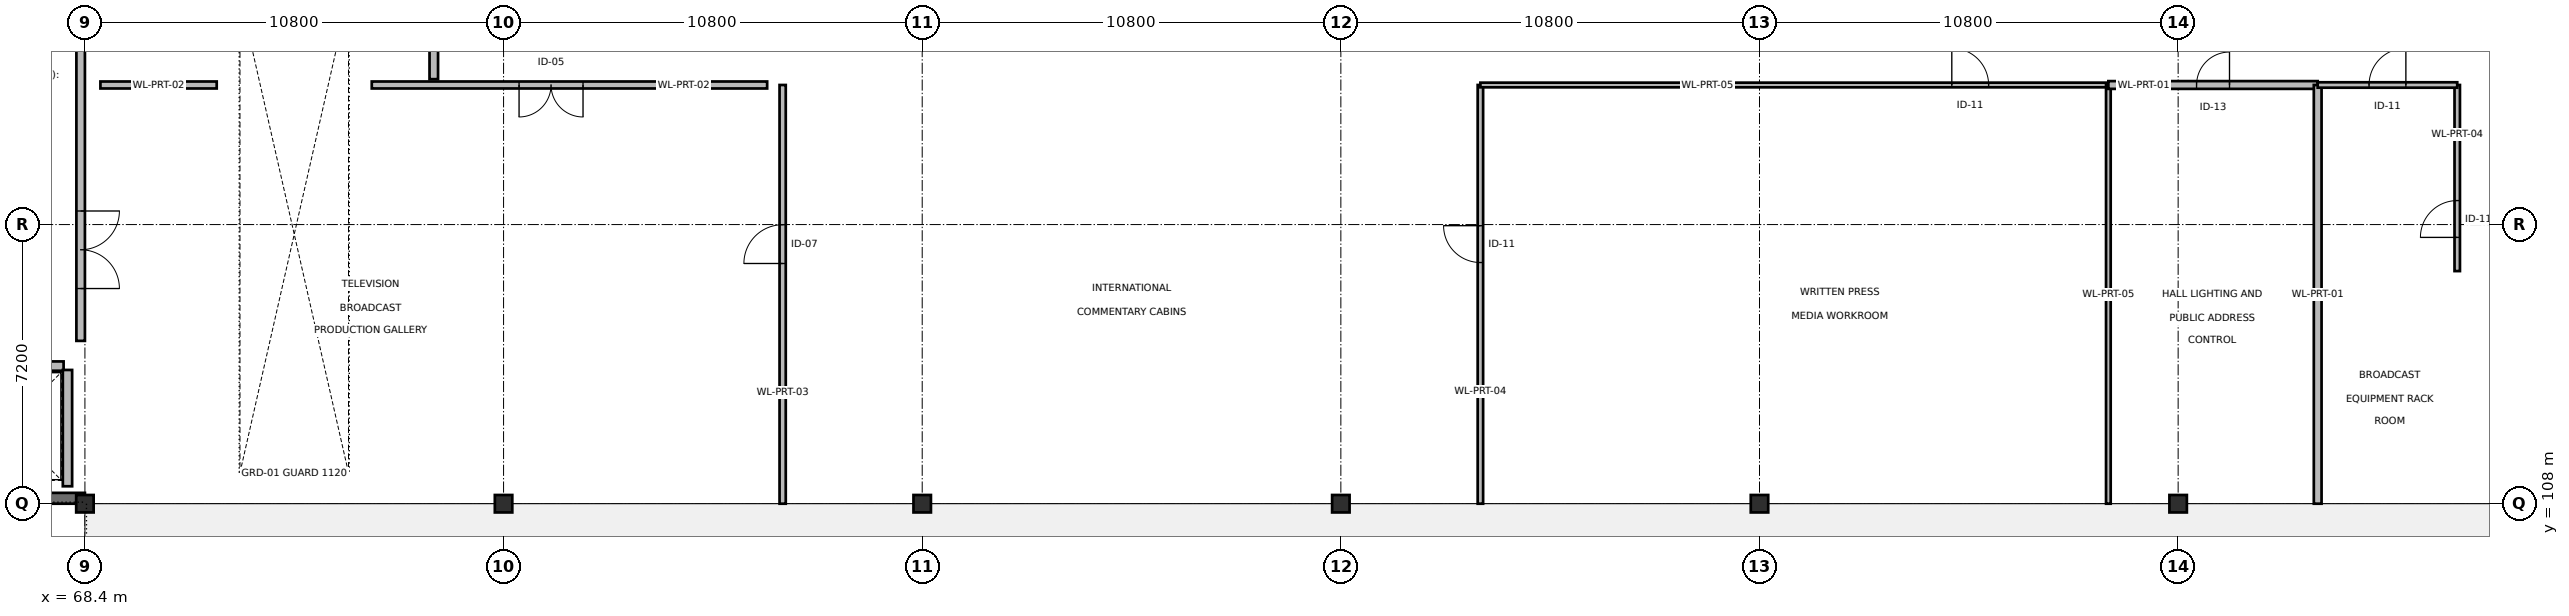
"""IFC4 building model, lengths in metres.
Left out: names, types, materials, properties, quantities, classifications, styles, units other than length and angle.
Written with IfcOpenShell. Run it as: python <this file> out.ifc"""

import sys

from ifc_helpers import new_model, si_unit, direction, frame, frame_2d, origin, origin_2d, place, context, subcontext, project, spatial, rectangle, extrude, element, fill, save


model = new_model("IFC4")
c1 = context("Model", 3, precision=1e-05, world=origin(), true_north=direction((0.0, 1.0)))
c2 = subcontext(c1, "Body", "Model", "MODEL_VIEW")
j1 = project(units=[si_unit("LENGTHUNIT", "METRE"), si_unit("PLANEANGLEUNIT", "RADIAN")], contexts=[c1])
p1 = place(None, origin())
s1 = spatial("IfcSite", under=j1, at=p1, CompositionType="ELEMENT")
p2 = place(p1, origin())
s2 = spatial("IfcBuilding", under=s1, at=p2, CompositionType="ELEMENT")
p3 = place(p2, frame((0.0, 0.0, 9.6)))
s3 = spatial("IfcBuildingStorey", under=s2, at=p3, CompositionType="ELEMENT", Elevation=9.6)
for number, where, z_axis, x_axis in (
    (1, (68.4, 108.0, 0.0), (0.0, 0.0, 1.0), (1.0, 0.0, 0.0)),
    (2, (79.2, 108.0, 0.0), (0.0, 0.0, 1.0), (1.0, 0.0, 0.0)),
    (3, (90.0, 108.0, 0.0), (0.0, 0.0, 1.0), (1.0, 0.0, 0.0)),
    (4, (100.8, 108.0, 0.0), (0.0, 0.0, 1.0), (1.0, 0.0, 0.0)),
    (5, (111.6, 108.0, 0.0), (0.0, 0.0, 1.0), (1.0, 0.0, 0.0)),
    (6, (122.4, 108.0, 0.0), (0.0, 0.0, 1.0), (1.0, 0.0, 0.0)),
):
    element("IfcColumn", number, at=place(p3, frame(where, z_axis=z_axis, x_axis=x_axis)), inside=s3, PredefinedType="COLUMN", context=c2, shape_type="SweptSolid", body=[
        extrude(rectangle(XDim=0.45, YDim=0.45, at=origin_2d()), origin(), (0.0, 0.0, 1.0), 4.5),
    ])
p4 = place(p3, frame((57.6, 108.14, 0.0), z_axis=(0.0, 0.0, 1.0), x_axis=(1.0, 0.0, 0.0)))
e7 = element("IfcWall", 7, at=p4, inside=s3, PredefinedType="SHEAR", context=c2, shape_type="SweptSolid", body=[
    extrude(rectangle(XDim=10.8, YDim=0.28, at=frame_2d((5.4, 0.0))), origin(), (0.0, 0.0, 1.0), 4.5),
])
p5 = place(p3, frame((64.95, 111.55, 0.0), z_axis=(0.0, 0.0, 1.0), x_axis=(1.0, 0.0, 0.0)))
e8 = element("IfcWall", 8, at=p5, inside=s3, PredefinedType="SOLIDWALL", context=c2, shape_type="SweptSolid", body=[
    extrude(rectangle(XDim=2.9, YDim=0.24, at=frame_2d((1.45, 0.0))), origin(), (0.0, 0.0, 1.0), 4.205),
])
p6 = place(p5, frame((0.9, 0.0, 0.0)))
e9 = element("IfcOpeningElement", 9, at=p6, cuts=e8, PredefinedType="OPENING", context=c2, shape_type="SweptSolid", body=[
    extrude(rectangle(XDim=1.1, YDim=2.15, at=frame_2d((0.55, 1.075))), frame((0.0, 0.13, 0.0), z_axis=(0.0, -1.0, 0.0), x_axis=(1.0, 0.0, 0.0)), (0.0, 0.0, 1.0), 0.26),
])
p7 = place(p3, frame((67.95, 108.45, 0.0), z_axis=(0.0, 0.0, 1.0), x_axis=(0.0, 1.0, 0.0)))
e10 = element("IfcWall", 10, at=p7, inside=s3, PredefinedType="SOLIDWALL", context=c2, shape_type="SweptSolid", body=[
    extrude(rectangle(XDim=3.0, YDim=0.24, at=frame_2d((1.5, 0.0))), origin(), (0.0, 0.0, 1.0), 4.205),
])
p8 = place(p3, frame((68.29, 112.2, 0.0), z_axis=(0.0, 0.0, 1.0), x_axis=(0.0, 1.0, 0.0)))
e11 = element("IfcWall", 11, at=p8, inside=s3, PredefinedType="PARTITIONING", context=c2, shape_type="SweptSolid", body=[
    extrude(rectangle(XDim=9.75, YDim=0.22, at=frame_2d((4.875, 0.0))), origin(), (0.0, 0.0, 1.0), 4.205),
])
p9 = place(p8, frame((1.35, 0.0, 0.0)))
e12 = element("IfcOpeningElement", 12, at=p9, cuts=e11, PredefinedType="OPENING", context=c2, shape_type="SweptSolid", body=[
    extrude(rectangle(XDim=2.0, YDim=2.2, at=frame_2d((1.0, 1.1))), frame((0.0, 0.12, 0.0), z_axis=(0.0, -1.0, 0.0), x_axis=(1.0, 0.0, 0.0)), (0.0, 0.0, 1.0), 0.24),
])
p10 = place(p3, frame((68.8, 118.8, 0.0), z_axis=(0.0, 0.0, 1.0), x_axis=(1.0, 0.0, 0.0)))
e13 = element("IfcWall", 13, at=p10, inside=s3, PredefinedType="PARTITIONING", context=c2, shape_type="SweptSolid", body=[
    extrude(rectangle(XDim=3.0, YDim=0.18, at=frame_2d((1.5, 0.0))), origin(), (0.0, 0.0, 1.0), 3.885),
])
p11 = place(p3, frame((75.8, 118.8, 0.0), z_axis=(0.0, 0.0, 1.0), x_axis=(1.0, 0.0, 0.0)))
e14 = element("IfcWall", 14, at=p11, inside=s3, PredefinedType="PARTITIONING", context=c2, shape_type="SweptSolid", body=[
    extrude(rectangle(XDim=10.2, YDim=0.18, at=frame_2d((5.1, 0.0))), origin(), (0.0, 0.0, 1.0), 2.682),
])
p12 = place(p11, frame((3.8, 0.0, 0.0)))
e15 = element("IfcOpeningElement", 15, at=p12, cuts=e14, PredefinedType="OPENING", context=c2, shape_type="SweptSolid", body=[
    extrude(rectangle(XDim=1.65, YDim=2.2, at=frame_2d((0.825, 1.1))), frame((0.0, 0.1, 0.0), z_axis=(0.0, -1.0, 0.0), x_axis=(1.0, 0.0, 0.0)), (0.0, 0.0, 1.0), 0.2),
])
p13 = place(p3, frame((86.4, 108.0, 0.0), z_axis=(0.0, 0.0, 1.0), x_axis=(0.0, 1.0, 0.0)))
e16 = element("IfcWall", 16, at=p13, inside=s3, PredefinedType="PARTITIONING", context=c2, shape_type="SweptSolid", body=[
    extrude(rectangle(XDim=10.8, YDim=0.16, at=frame_2d((5.4, 0.0))), origin(), (0.0, 0.0, 1.0), 2.325),
])
p14 = place(p13, frame((6.196, 0.0, 0.0)))
e17 = element("IfcOpeningElement", 17, at=p14, cuts=e16, PredefinedType="OPENING", context=c2, shape_type="SweptSolid", body=[
    extrude(rectangle(XDim=1.0, YDim=2.1, at=frame_2d((0.5, 1.05))), frame((0.0, 0.09, 0.0), z_axis=(0.0, -1.0, 0.0), x_axis=(1.0, 0.0, 0.0)), (0.0, 0.0, 1.0), 0.18),
])
p15 = place(p3, frame((104.4, 108.0, 0.0), z_axis=(0.0, 0.0, 1.0), x_axis=(0.0, 1.0, 0.0)))
e18 = element("IfcWall", 18, at=p15, inside=s3, PredefinedType="PARTITIONING", context=c2, shape_type="SweptSolid", body=[
    extrude(rectangle(XDim=10.8, YDim=0.14, at=frame_2d((5.4, 0.0))), origin(), (0.0, 0.0, 1.0), 2.325),
])
p16 = place(p15, frame((6.221, 0.0, 0.0)))
e19 = element("IfcOpeningElement", 19, at=p16, cuts=e18, PredefinedType="OPENING", context=c2, shape_type="SweptSolid", body=[
    extrude(rectangle(XDim=0.95, YDim=2.1, at=frame_2d((0.475, 1.05))), frame((0.0, 0.08, 0.0), z_axis=(0.0, -1.0, 0.0), x_axis=(1.0, 0.0, 0.0)), (0.0, 0.0, 1.0), 0.16),
])
p17 = place(p3, frame((104.4, 118.8, 0.0), z_axis=(0.0, 0.0, 1.0), x_axis=(1.0, 0.0, 0.0)))
e20 = element("IfcWall", 20, at=p17, inside=s3, PredefinedType="PARTITIONING", context=c2, shape_type="SweptSolid", body=[
    extrude(rectangle(XDim=16.2, YDim=0.12, at=frame_2d((8.1, 0.0))), origin(), (0.0, 0.0, 1.0), 2.325),
])
p18 = place(p17, frame((12.161, 0.0, 0.0)))
e21 = element("IfcOpeningElement", 21, at=p18, cuts=e20, PredefinedType="OPENING", context=c2, shape_type="SweptSolid", body=[
    extrude(rectangle(XDim=0.95, YDim=2.1, at=frame_2d((0.475, 1.05))), frame((0.0, 0.07, 0.0), z_axis=(0.0, -1.0, 0.0), x_axis=(1.0, 0.0, 0.0)), (0.0, 0.0, 1.0), 0.14),
])
p19 = place(p3, frame((120.6, 108.0, 0.0), z_axis=(0.0, 0.0, 1.0), x_axis=(0.0, 1.0, 0.0)))
e22 = element("IfcWall", 22, at=p19, inside=s3, PredefinedType="PARTITIONING", context=c2, shape_type="SweptSolid", body=[
    extrude(rectangle(XDim=10.8, YDim=0.12, at=frame_2d((5.4, 0.0))), origin(), (0.0, 0.0, 1.0), 2.325),
])
p20 = place(p3, frame((120.6, 118.8, 0.0), z_axis=(0.0, 0.0, 1.0), x_axis=(1.0, 0.0, 0.0)))
e23 = element("IfcWall", 23, at=p20, inside=s3, PredefinedType="PARTITIONING", context=c2, shape_type="SweptSolid", body=[
    extrude(rectangle(XDim=5.4, YDim=0.2, at=frame_2d((2.7, 0.0))), origin(), (0.0, 0.0, 1.0), 2.325),
])
p21 = place(p20, frame((2.275, 0.0, 0.0)))
e24 = element("IfcOpeningElement", 24, at=p21, cuts=e23, PredefinedType="OPENING", context=c2, shape_type="SweptSolid", body=[
    extrude(rectangle(XDim=0.85, YDim=2.05, at=frame_2d((0.425, 1.025))), frame((0.0, 0.11, 0.0), z_axis=(0.0, -1.0, 0.0), x_axis=(1.0, 0.0, 0.0)), (0.0, 0.0, 1.0), 0.22),
])
p22 = place(p3, frame((126.0, 108.0, 0.0), z_axis=(0.0, 0.0, 1.0), x_axis=(0.0, 1.0, 0.0)))
e25 = element("IfcWall", 25, at=p22, inside=s3, PredefinedType="PARTITIONING", context=c2, shape_type="SweptSolid", body=[
    extrude(rectangle(XDim=10.8, YDim=0.2, at=frame_2d((5.4, 0.0))), origin(), (0.0, 0.0, 1.0), 2.325),
])
p23 = place(p3, frame((129.6, 114.0, 0.0), z_axis=(0.0, 0.0, 1.0), x_axis=(0.0, 1.0, 0.0)))
e26 = element("IfcWall", 26, at=p23, inside=s3, PredefinedType="PARTITIONING", context=c2, shape_type="SweptSolid", body=[
    extrude(rectangle(XDim=4.8, YDim=0.14, at=frame_2d((2.4, 0.0))), origin(), (0.0, 0.0, 1.0), 2.325),
])
p24 = place(p23, frame((0.869, 0.0, 0.0)))
e27 = element("IfcOpeningElement", 27, at=p24, cuts=e26, PredefinedType="OPENING", context=c2, shape_type="SweptSolid", body=[
    extrude(rectangle(XDim=0.95, YDim=2.1, at=frame_2d((0.475, 1.05))), frame((0.0, 0.08, 0.0), z_axis=(0.0, -1.0, 0.0), x_axis=(1.0, 0.0, 0.0)), (0.0, 0.0, 1.0), 0.16),
])
p25 = place(p3, frame((126.0, 118.8, 0.0), z_axis=(0.0, 0.0, 1.0), x_axis=(1.0, 0.0, 0.0)))
e28 = element("IfcWall", 28, at=p25, inside=s3, PredefinedType="PARTITIONING", context=c2, shape_type="SweptSolid", body=[
    extrude(rectangle(XDim=3.6, YDim=0.14, at=frame_2d((1.8, 0.0))), origin(), (0.0, 0.0, 1.0), 2.325),
])
p26 = place(p25, frame((1.325, 0.0, 0.0)))
e29 = element("IfcOpeningElement", 29, at=p26, cuts=e28, PredefinedType="OPENING", context=c2, shape_type="SweptSolid", body=[
    extrude(rectangle(XDim=0.95, YDim=2.1, at=frame_2d((0.475, 1.05))), frame((0.0, 0.08, 0.0), z_axis=(0.0, -1.0, 0.0), x_axis=(1.0, 0.0, 0.0)), (0.0, 0.0, 1.0), 0.16),
])
p27 = place(p3, frame((77.4, 121.95, 0.0), z_axis=(0.0, 0.0, 1.0), x_axis=(0.0, -1.0, 0.0)))
e30 = element("IfcWall", 30, at=p27, inside=s3, PredefinedType="PARTITIONING", context=c2, shape_type="SweptSolid", body=[
    extrude(rectangle(XDim=3.0, YDim=0.22, at=frame_2d((1.5, 0.0))), origin(), (0.0, 0.0, 1.0), 3.885),
])
p28 = place(p27, frame((0.9, 0.0, 0.0)))
e31 = element("IfcOpeningElement", 31, at=p28, cuts=e30, PredefinedType="OPENING", context=c2, shape_type="SweptSolid", body=[
    extrude(rectangle(XDim=1.15, YDim=2.2, at=frame_2d((0.575, 1.1))), frame((0.0, 0.12, 0.0), z_axis=(0.0, -1.0, 0.0), x_axis=(1.0, 0.0, 0.0)), (0.0, 0.0, 1.0), 0.24),
])
p29 = place(p9, origin())
e32 = element("IfcDoor", 32, at=p29, inside=s3, OperationType="DOUBLE_DOOR_SINGLE_SWING", PredefinedType="DOOR", context=c2, shape_type="SweptSolid", body=[
    extrude(rectangle(XDim=2.0, YDim=2.2, at=frame_2d((1.0, 1.1))), frame((0.0, 0.025, 0.0), z_axis=(0.0, -1.0, 0.0), x_axis=(1.0, 0.0, 0.0)), (0.0, 0.0, 1.0), 0.05),
])
fill(e12, e32)
p30 = place(p12, origin())
e33 = element("IfcDoor", 33, at=p30, inside=s3, OperationType="DOUBLE_DOOR_SINGLE_SWING", PredefinedType="DOOR", context=c2, shape_type="SweptSolid", body=[
    extrude(rectangle(XDim=1.65, YDim=2.2, at=frame_2d((0.825, 1.1))), frame((0.0, 0.025, 0.0), z_axis=(0.0, -1.0, 0.0), x_axis=(1.0, 0.0, 0.0)), (0.0, 0.0, 1.0), 0.05),
])
fill(e15, e33)
p31 = place(p14, origin())
e34 = element("IfcDoor", 34, at=p31, inside=s3, OperationType="SINGLE_SWING_LEFT", PredefinedType="DOOR", context=c2, shape_type="SweptSolid", body=[
    extrude(rectangle(XDim=1.0, YDim=2.1, at=frame_2d((0.5, 1.05))), frame((0.0, 0.025, 0.0), z_axis=(0.0, -1.0, 0.0), x_axis=(1.0, 0.0, 0.0)), (0.0, 0.0, 1.0), 0.05),
])
fill(e17, e34)
p32 = place(p16, origin())
e35 = element("IfcDoor", 35, at=p32, inside=s3, OperationType="SINGLE_SWING_RIGHT", PredefinedType="DOOR", context=c2, shape_type="SweptSolid", body=[
    extrude(rectangle(XDim=0.95, YDim=2.1, at=frame_2d((0.475, 1.05))), frame((0.0, 0.025, 0.0), z_axis=(0.0, -1.0, 0.0), x_axis=(1.0, 0.0, 0.0)), (0.0, 0.0, 1.0), 0.05),
])
fill(e19, e35)
p33 = place(p18, origin())
e36 = element("IfcDoor", 36, at=p33, inside=s3, OperationType="SINGLE_SWING_LEFT", PredefinedType="DOOR", context=c2, shape_type="SweptSolid", body=[
    extrude(rectangle(XDim=0.95, YDim=2.1, at=frame_2d((0.475, 1.05))), frame((0.0, 0.025, 0.0), z_axis=(0.0, -1.0, 0.0), x_axis=(1.0, 0.0, 0.0)), (0.0, 0.0, 1.0), 0.05),
])
fill(e21, e36)
p34 = place(p21, origin())
e37 = element("IfcDoor", 37, at=p34, inside=s3, OperationType="SINGLE_SWING_RIGHT", PredefinedType="DOOR", context=c2, shape_type="SweptSolid", body=[
    extrude(rectangle(XDim=0.85, YDim=2.05, at=frame_2d((0.425, 1.025))), frame((0.0, 0.025, 0.0), z_axis=(0.0, -1.0, 0.0), x_axis=(1.0, 0.0, 0.0)), (0.0, 0.0, 1.0), 0.05),
])
fill(e24, e37)
p35 = place(p24, origin())
e38 = element("IfcDoor", 38, at=p35, inside=s3, OperationType="SINGLE_SWING_LEFT", PredefinedType="DOOR", context=c2, shape_type="SweptSolid", body=[
    extrude(rectangle(XDim=0.95, YDim=2.1, at=frame_2d((0.475, 1.05))), frame((0.0, 0.025, 0.0), z_axis=(0.0, -1.0, 0.0), x_axis=(1.0, 0.0, 0.0)), (0.0, 0.0, 1.0), 0.05),
])
fill(e27, e38)
p36 = place(p26, origin())
e39 = element("IfcDoor", 39, at=p36, inside=s3, OperationType="SINGLE_SWING_RIGHT", PredefinedType="DOOR", context=c2, shape_type="SweptSolid", body=[
    extrude(rectangle(XDim=0.95, YDim=2.1, at=frame_2d((0.475, 1.05))), frame((0.0, 0.025, 0.0), z_axis=(0.0, -1.0, 0.0), x_axis=(1.0, 0.0, 0.0)), (0.0, 0.0, 1.0), 0.05),
])
fill(e29, e39)
save(model, sys.argv[1])
